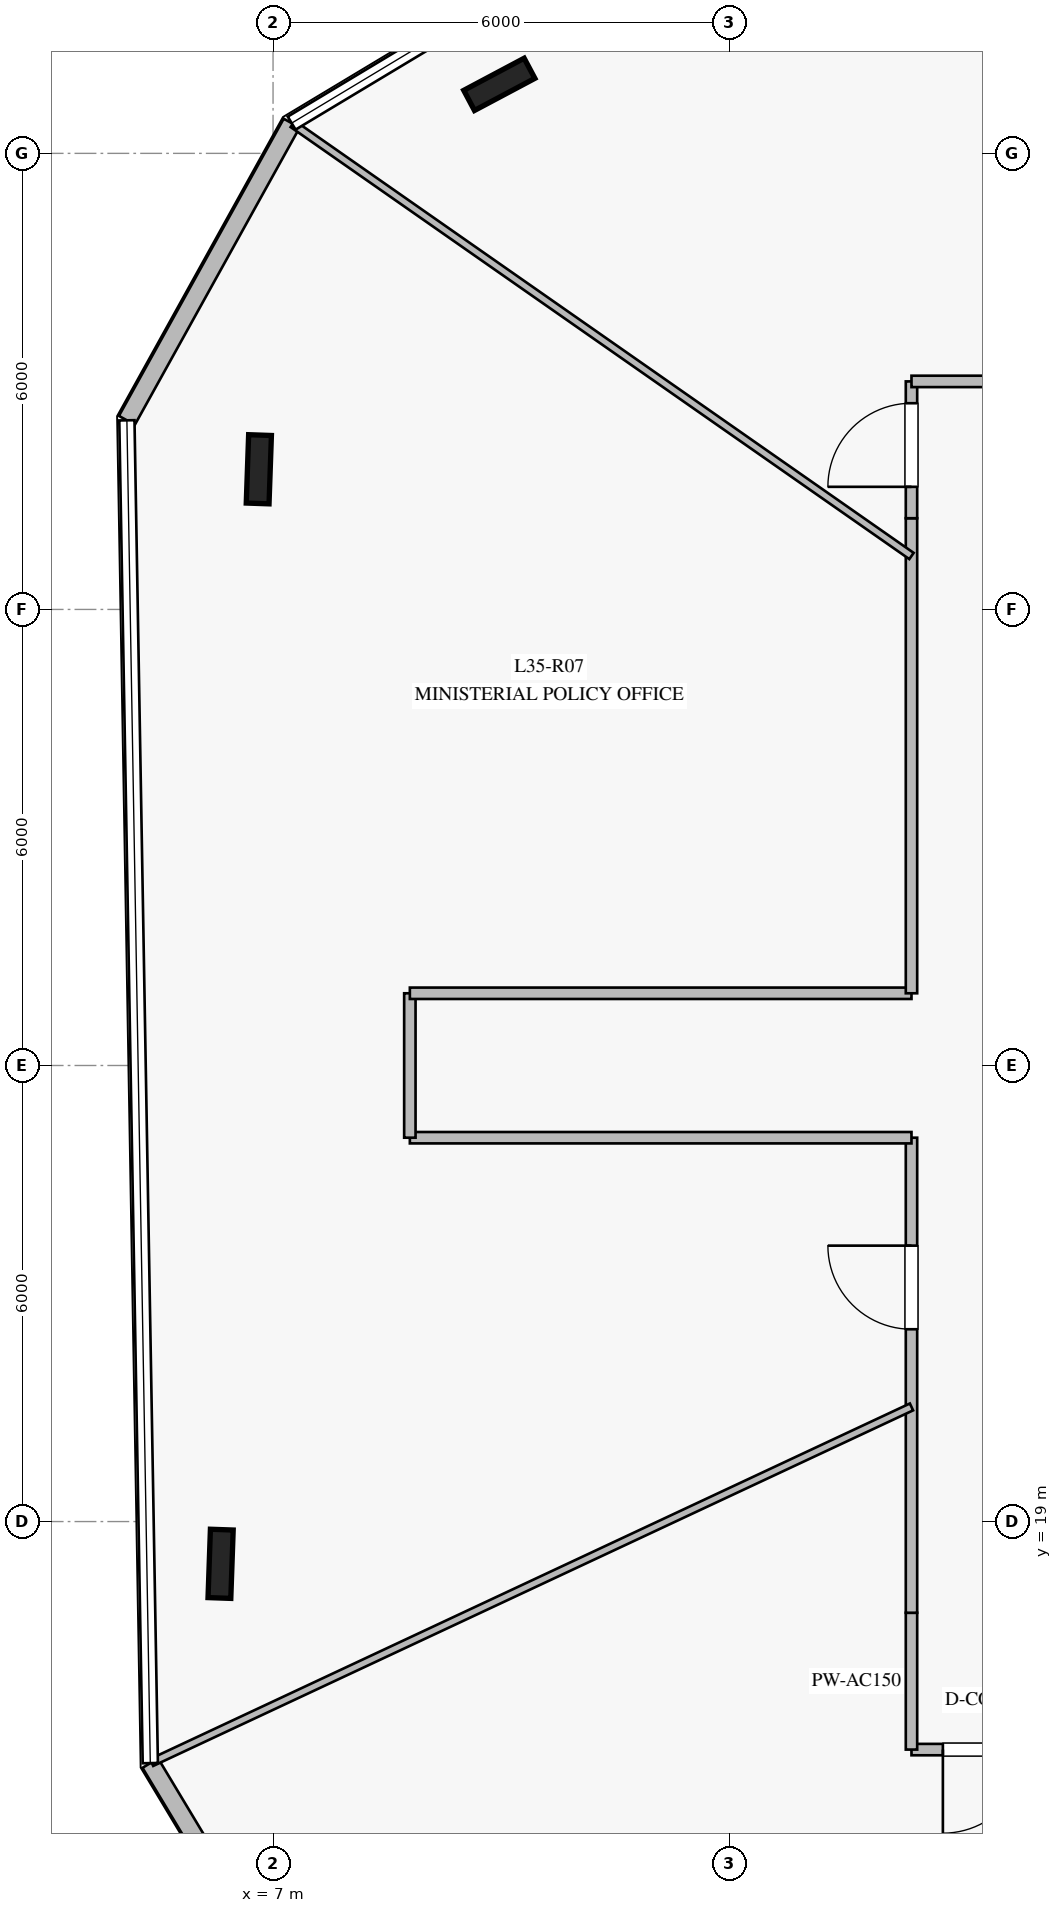
"""IFC4 building model, lengths in metres.
Left out: names, types, materials, properties, quantities, classifications, styles, units other than length and angle.
Written with IfcOpenShell. Run it as: python <this file> out.ifc"""

import sys

from ifc_helpers import new_model, si_unit, direction, frame, frame_2d, origin, origin_2d, place, context, subcontext, project, spatial, rectangle, i_section, extrude, element, fill, save


model = new_model("IFC4")
c1 = context("Model", 3, precision=1e-05, world=origin(), true_north=direction((0.0, 1.0)))
c2 = subcontext(c1, "Body", "Model", "MODEL_VIEW")
j1 = project(units=[si_unit("LENGTHUNIT", "METRE"), si_unit("PLANEANGLEUNIT", "RADIAN")], contexts=[c1])
p1 = place(None, origin())
s1 = spatial("IfcSite", under=j1, at=p1, CompositionType="ELEMENT")
p2 = place(p1, origin())
s2 = spatial("IfcBuilding", under=s1, at=p2, CompositionType="ELEMENT")
p3 = place(p2, frame((0.0, 0.0, 146.4)))
s3 = spatial("IfcBuildingStorey", under=s2, at=p3, CompositionType="ELEMENT", Elevation=146.4)
for number, where, z_axis, x_axis in (
    (1, (9.977, 37.908, 0.0), (0.0, 0.0, 1.0), (0.883, 0.469, 0.0)),
    (2, (6.813, 32.844, 0.0), (0.0, 0.0, 1.0), (0.035, 0.999, 0.0)),
    (3, (6.31, 18.444, 0.0), (0.0, 0.0, 1.0), (0.035, 0.999, 0.0)),
):
    element("IfcColumn", number, at=place(p3, frame(where, z_axis=z_axis, x_axis=x_axis)), inside=s3, PredefinedType="COLUMN", context=c2, shape_type="SweptSolid", body=[
        extrude(i_section(OverallWidth=0.3, OverallDepth=0.9, WebThickness=0.019, FlangeThickness=0.035, at=origin_2d()), origin(), (0.0, 0.0, 1.0), 4.0),
    ])
p4 = place(p3, frame((7.245, 37.398, 0.0), z_axis=(0.0, 0.0, 1.0), x_axis=(-0.484965863304, -0.874533081953, 0.0)))
e4 = element("IfcWall", 4, at=p4, inside=s3, PredefinedType="STANDARD", context=c2, shape_type="SweptSolid", body=[
    extrude(rectangle(XDim=4.471, YDim=0.24, at=frame_2d((2.235, 0.0))), origin(), (0.0, 0.0, 1.0), 3.76),
])
p5 = place(p3, frame((5.385, 15.822, 0.0), z_axis=(0.0, 0.0, 1.0), x_axis=(0.515113973, -0.857121691955, 0.0)))
e5 = element("IfcWall", 5, at=p5, inside=s3, PredefinedType="STANDARD", context=c2, shape_type="SweptSolid", body=[
    extrude(rectangle(XDim=4.471, YDim=0.24, at=frame_2d((2.235, 0.0))), origin(), (0.0, 0.0, 1.0), 3.76),
])
p6 = place(p3, frame((17.2, 16.0, 0.0), z_axis=(0.0, 0.0, 1.0), x_axis=(-1.0, 0.0, 0.0)))
e6 = element("IfcWall", 6, at=p6, inside=s3, PredefinedType="PARTITIONING", context=c2, shape_type="SweptSolid", body=[
    extrude(rectangle(XDim=1.8, YDim=0.15, at=frame_2d((0.9, 0.0))), origin(), (0.0, 0.0, 1.0), 3.36),
])
p7 = place(p6, frame((0.287, 0.0, 0.0)))
e7 = element("IfcOpeningElement", 7, at=p7, cuts=e6, PredefinedType="OPENING", context=c2, shape_type="SweptSolid", body=[
    extrude(rectangle(XDim=1.1, YDim=2.2, at=frame_2d((0.55, 1.1))), frame((0.0, 0.085, 0.0), z_axis=(0.0, -1.0, 0.0), x_axis=(1.0, 0.0, 0.0)), (0.0, 0.0, 1.0), 0.17),
])
p8 = place(p3, frame((15.4, 16.0, 0.0), z_axis=(0.0, 0.0, 1.0), x_axis=(0.0, 1.0, 0.0)))
e8 = element("IfcWall", 8, at=p8, inside=s3, PredefinedType="PARTITIONING", context=c2, shape_type="SweptSolid", body=[
    extrude(rectangle(XDim=1.8, YDim=0.15, at=frame_2d((0.9, 0.0))), origin(), (0.0, 0.0, 1.0), 3.21),
])
p9 = place(p3, frame((15.4, 17.8, 0.0), z_axis=(0.0, 0.0, 1.0), x_axis=(0.0, 1.0, 0.0)))
e9 = element("IfcWall", 9, at=p9, inside=s3, PredefinedType="PARTITIONING", context=c2, shape_type="SweptSolid", body=[
    extrude(rectangle(XDim=6.25, YDim=0.15, at=frame_2d((3.125, 0.0))), origin(), (0.0, 0.0, 1.0), 3.21),
])
p10 = place(p9, frame((3.73, 0.0, 0.0)))
e10 = element("IfcOpeningElement", 10, at=p10, cuts=e9, PredefinedType="OPENING", context=c2, shape_type="SweptSolid", body=[
    extrude(rectangle(XDim=1.1, YDim=2.2, at=frame_2d((0.55, 1.1))), frame((0.0, 0.085, 0.0), z_axis=(0.0, -1.0, 0.0), x_axis=(1.0, 0.0, 0.0)), (0.0, 0.0, 1.0), 0.17),
])
p11 = place(p3, frame((15.4, 24.05, 0.0), z_axis=(0.0, 0.0, 1.0), x_axis=(-1.0, 0.0, 0.0)))
e11 = element("IfcWall", 11, at=p11, inside=s3, PredefinedType="PARTITIONING", context=c2, shape_type="SweptSolid", body=[
    extrude(rectangle(XDim=6.6, YDim=0.15, at=frame_2d((3.3, 0.0))), origin(), (0.0, 0.0, 1.0), 3.36),
])
p12 = place(p3, frame((8.8, 24.05, 0.0), z_axis=(0.0, 0.0, 1.0), x_axis=(0.0, 1.0, 0.0)))
e12 = element("IfcWall", 12, at=p12, inside=s3, PredefinedType="PARTITIONING", context=c2, shape_type="SweptSolid", body=[
    extrude(rectangle(XDim=1.9, YDim=0.15, at=frame_2d((0.95, 0.0))), origin(), (0.0, 0.0, 1.0), 3.76),
])
p13 = place(p3, frame((8.8, 25.95, 0.0), z_axis=(0.0, 0.0, 1.0), x_axis=(1.0, 0.0, 0.0)))
e13 = element("IfcWall", 13, at=p13, inside=s3, PredefinedType="PARTITIONING", context=c2, shape_type="SweptSolid", body=[
    extrude(rectangle(XDim=6.6, YDim=0.15, at=frame_2d((3.3, 0.0))), origin(), (0.0, 0.0, 1.0), 3.36),
])
p14 = place(p3, frame((15.4, 25.95, 0.0), z_axis=(0.0, 0.0, 1.0), x_axis=(0.0, 1.0, 0.0)))
e14 = element("IfcWall", 14, at=p14, inside=s3, PredefinedType="PARTITIONING", context=c2, shape_type="SweptSolid", body=[
    extrude(rectangle(XDim=6.25, YDim=0.15, at=frame_2d((3.125, 0.0))), origin(), (0.0, 0.0, 1.0), 3.21),
])
p15 = place(p3, frame((15.4, 32.2, 0.0), z_axis=(0.0, 0.0, 1.0), x_axis=(0.0, 1.0, 0.0)))
e15 = element("IfcWall", 15, at=p15, inside=s3, PredefinedType="PARTITIONING", context=c2, shape_type="SweptSolid", body=[
    extrude(rectangle(XDim=1.8, YDim=0.15, at=frame_2d((0.9, 0.0))), origin(), (0.0, 0.0, 1.0), 3.21),
])
p16 = place(p15, frame((0.413, 0.0, 0.0)))
e16 = element("IfcOpeningElement", 16, at=p16, cuts=e15, PredefinedType="OPENING", context=c2, shape_type="SweptSolid", body=[
    extrude(rectangle(XDim=1.1, YDim=2.2, at=frame_2d((0.55, 1.1))), frame((0.0, 0.085, 0.0), z_axis=(0.0, -1.0, 0.0), x_axis=(1.0, 0.0, 0.0)), (0.0, 0.0, 1.0), 0.17),
])
p17 = place(p3, frame((15.4, 34.0, 0.0), z_axis=(0.0, 0.0, 1.0), x_axis=(1.0, 0.0, 0.0)))
e17 = element("IfcWall", 17, at=p17, inside=s3, PredefinedType="PARTITIONING", context=c2, shape_type="SweptSolid", body=[
    extrude(rectangle(XDim=1.8, YDim=0.15, at=frame_2d((0.9, 0.0))), origin(), (0.0, 0.0, 1.0), 3.76),
])
p18 = place(p3, frame((15.4, 31.703, 0.0), z_axis=(0.0, 0.0, 1.0), x_axis=(-0.819886429215, 0.572526194325, 0.0)))
e18 = element("IfcWall", 18, at=p18, inside=s3, PredefinedType="MOVABLE", context=c2, shape_type="SweptSolid", body=[
    extrude(rectangle(XDim=9.928, YDim=0.1, at=frame_2d((4.964, 0.0))), origin(), (0.0, 0.0, 1.0), 3.16),
])
p19 = place(p3, frame((15.4, 20.508, 0.0), z_axis=(0.0, 0.0, 1.0), x_axis=(-0.905754360865, -0.423803064847, 0.0)))
e19 = element("IfcWall", 19, at=p19, inside=s3, PredefinedType="MOVABLE", context=c2, shape_type="SweptSolid", body=[
    extrude(rectangle(XDim=11.038, YDim=0.1, at=frame_2d((5.519, 0.0))), origin(), (0.0, 0.0, 1.0), 3.16),
])
p20 = place(p7, origin())
e20 = element("IfcDoor", 20, at=p20, inside=s3, OperationType="SINGLE_SWING_RIGHT", PredefinedType="DOOR", context=c2, shape_type="SweptSolid", body=[
    extrude(rectangle(XDim=1.1, YDim=2.2, at=frame_2d((0.55, 1.1))), frame((0.0, 0.025, 0.0), z_axis=(0.0, -1.0, 0.0), x_axis=(1.0, 0.0, 0.0)), (0.0, 0.0, 1.0), 0.05),
])
fill(e7, e20)
p21 = place(p16, origin())
e21 = element("IfcDoor", 21, at=p21, inside=s3, OperationType="SINGLE_SWING_LEFT", PredefinedType="DOOR", context=c2, shape_type="SweptSolid", body=[
    extrude(rectangle(XDim=1.1, YDim=2.2, at=frame_2d((0.55, 1.1))), frame((0.0, 0.025, 0.0), z_axis=(0.0, -1.0, 0.0), x_axis=(1.0, 0.0, 0.0)), (0.0, 0.0, 1.0), 0.05),
])
fill(e16, e21)
p22 = place(p10, origin())
e22 = element("IfcDoor", 22, at=p22, inside=s3, OperationType="SINGLE_SWING_RIGHT", PredefinedType="DOOR", context=c2, shape_type="SweptSolid", body=[
    extrude(rectangle(XDim=1.1, YDim=2.2, at=frame_2d((0.55, 1.1))), frame((0.0, 0.025, 0.0), z_axis=(0.0, -1.0, 0.0), x_axis=(1.0, 0.0, 0.0)), (0.0, 0.0, 1.0), 0.05),
])
fill(e10, e22)
save(model, sys.argv[1])
